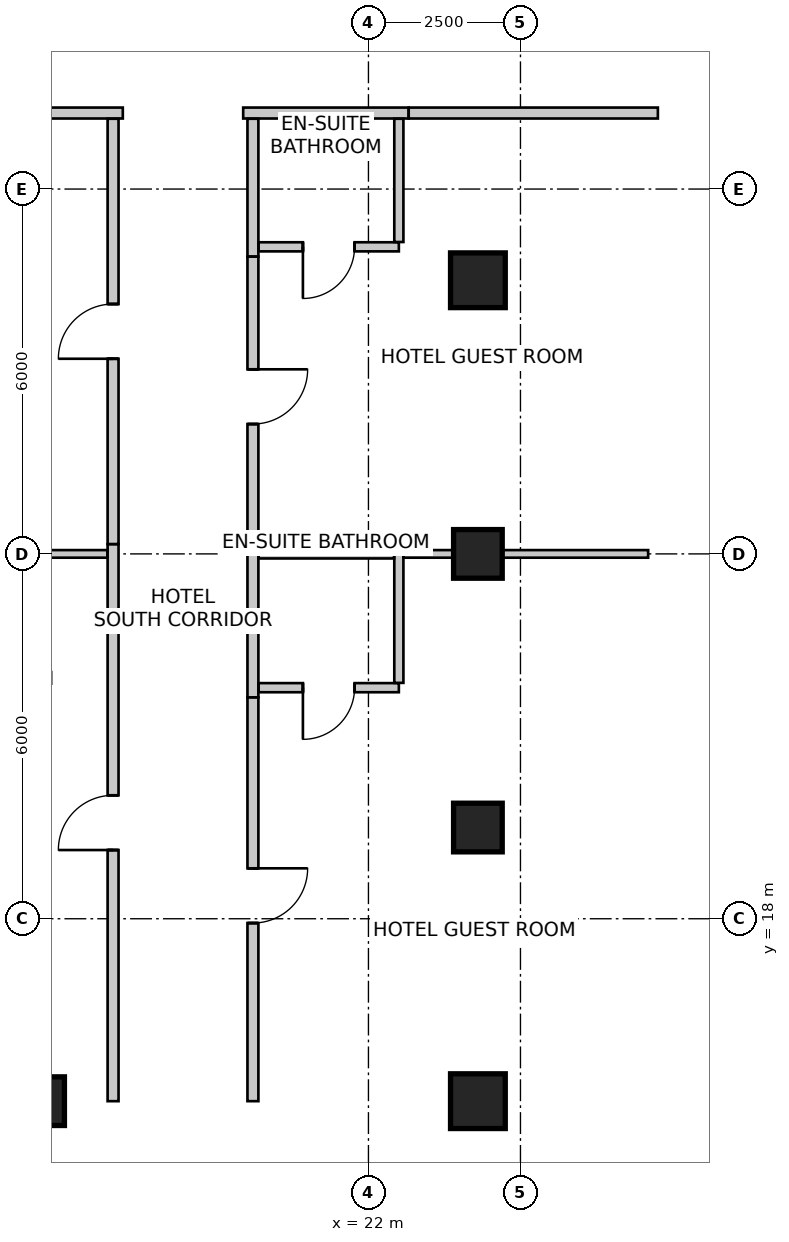
"""IFC4 building model, lengths in metres.
Left out: names, types, materials, properties, quantities, classifications, styles, units other than length and angle.
Written with IfcOpenShell. Run it as: python <this file> out.ifc"""

import sys

from ifc_helpers import new_model, si_unit, direction, frame, frame_2d, origin, origin_2d, place, context, subcontext, project, spatial, rectangle, extrude, source, transform, mapped, element, fill, save


model = new_model("IFC4")
c1 = context("Model", 3, precision=1e-05, world=origin(), true_north=direction((0.0, 1.0)))
c2 = subcontext(c1, "Body", "Model", "MODEL_VIEW")
j1 = project(units=[si_unit("LENGTHUNIT", "METRE"), si_unit("PLANEANGLEUNIT", "RADIAN")], contexts=[c1])
p1 = place(None, origin())
s1 = spatial("IfcSite", under=j1, at=p1, CompositionType="ELEMENT")
p2 = place(p1, origin())
s2 = spatial("IfcBuilding", under=s1, at=p2, CompositionType="ELEMENT")
p3 = place(p2, frame((0.0, 0.0, 114.2)))
s3 = spatial("IfcBuildingStorey", under=s2, at=p3, CompositionType="ELEMENT", Elevation=114.2)
m1 = source(origin(), c2, "Body", "SweptSolid", [
    extrude(rectangle(XDim=0.9, YDim=0.9, at=origin_2d()), origin(), (0.0, 0.0, 1.0), 3.6),
])
p4 = place(p3, frame((23.8, 28.5, 0.0), z_axis=(0.0, 0.0, 1.0), x_axis=(1.0, 0.0, 0.0)))
e1 = element("IfcColumn", 1, at=p4, inside=s3, PredefinedType="COLUMN", context=c2, shape_type="MappedRepresentation", body=[
    mapped(m1, transform((0.0, 0.0, 0.0), scale=1.0)),
])
m2 = source(origin(), c2, "Body", "SweptSolid", [
    extrude(rectangle(XDim=0.8, YDim=0.8, at=origin_2d()), origin(), (0.0, 0.0, 1.0), 3.6),
])
for number, where, z_axis, x_axis in (
    (2, (23.8, 24.0, 0.0), (0.0, 0.0, 1.0), (1.0, 0.0, 0.0)),
    (3, (23.8, 19.5, 0.0), (0.0, 0.0, 1.0), (1.0, 0.0, 0.0)),
):
    element("IfcColumn", number, at=place(p3, frame(where, z_axis=z_axis, x_axis=x_axis)), inside=s3, PredefinedType="COLUMN", context=c2, shape_type="MappedRepresentation", body=[
        mapped(m2, transform((0.0, 0.0, 0.0), scale=1.0)),
    ])
p5 = place(p3, frame((23.8, 15.0, 0.0), z_axis=(0.0, 0.0, 1.0), x_axis=(1.0, 0.0, 0.0)))
e4 = element("IfcColumn", 4, at=p5, inside=s3, PredefinedType="COLUMN", context=c2, shape_type="MappedRepresentation", body=[
    mapped(m1, transform((0.0, 0.0, 0.0), scale=1.0)),
])
p6 = place(p3, frame((16.6, 15.0, 0.0), z_axis=(0.0, 0.0, 1.0), x_axis=(1.0, 0.0, 0.0)))
e5 = element("IfcColumn", 5, at=p6, inside=s3, PredefinedType="COLUMN", context=c2, shape_type="MappedRepresentation", body=[
    mapped(m2, transform((0.0, 0.0, 0.0), scale=1.0)),
])
p7 = place(p3, frame((17.96, 31.25, 0.0), z_axis=(0.0, 0.0, 1.0), x_axis=(-1.0, 0.0, 0.0)))
e6 = element("IfcWall", 6, at=p7, inside=s3, PredefinedType="PARTITIONING", context=c2, shape_type="SweptSolid", body=[
    extrude(rectangle(XDim=5.366, YDim=0.18, at=frame_2d((2.683, 0.0))), origin(), (0.0, 0.0, 1.0), 2.935),
])
p8 = place(p3, frame((22.66, 31.25, 0.0), z_axis=(0.0, 0.0, 1.0), x_axis=(-1.0, 0.0, 0.0)))
e7 = element("IfcWall", 7, at=p8, inside=s3, PredefinedType="PARTITIONING", context=c2, shape_type="SweptSolid", body=[
    extrude(rectangle(XDim=2.72, YDim=0.18, at=frame_2d((1.36, 0.0))), origin(), (0.0, 0.0, 1.0), 2.935),
])
p9 = place(p3, frame((26.76, 31.25, 0.0), z_axis=(0.0, 0.0, 1.0), x_axis=(-1.0, 0.0, 0.0)))
e8 = element("IfcWall", 8, at=p9, inside=s3, PredefinedType="PARTITIONING", context=c2, shape_type="SweptSolid", body=[
    extrude(rectangle(XDim=4.098, YDim=0.18, at=frame_2d((2.049, 0.0))), origin(), (0.0, 0.0, 1.0), 3.35),
])
p10 = place(p3, frame((17.8, 15.0, 0.0), z_axis=(0.0, 0.0, 1.0), x_axis=(0.0, 1.0, 0.0)))
e9 = element("IfcWall", 9, at=p10, inside=s3, PredefinedType="PARTITIONING", context=c2, shape_type="SweptSolid", body=[
    extrude(rectangle(XDim=9.16, YDim=0.18, at=frame_2d((4.58, 0.0))), origin(), (0.0, 0.0, 1.0), 2.492),
])
m3 = source(origin(), c2, "Body", "SweptSolid", [
    extrude(rectangle(XDim=0.9, YDim=2.15, at=frame_2d((0.45, 1.075))), frame((0.0, 0.1, 0.0), z_axis=(0.0, -1.0, 0.0), x_axis=(1.0, 0.0, 0.0)), (0.0, 0.0, 1.0), 0.2),
])
p11 = place(p10, frame((4.13, 0.0, 0.0)))
e10 = element("IfcOpeningElement", 10, at=p11, cuts=e9, PredefinedType="OPENING", context=c2, shape_type="MappedRepresentation", body=[
    mapped(m3, transform((0.0, 0.0, 0.0), scale=1.0)),
])
p12 = place(p3, frame((20.1, 24.16, 0.0), z_axis=(0.0, 0.0, 1.0), x_axis=(0.0, -1.0, 0.0)))
e11 = element("IfcWall", 11, at=p12, inside=s3, PredefinedType="PARTITIONING", context=c2, shape_type="SweptSolid", body=[
    extrude(rectangle(XDim=2.52, YDim=0.18, at=frame_2d((1.26, 0.0))), origin(), (0.0, 0.0, 1.0), 2.803),
])
p13 = place(p3, frame((20.1, 21.638, 0.0), z_axis=(0.0, 0.0, 1.0), x_axis=(0.0, -1.0, 0.0)))
e12 = element("IfcWall", 12, at=p13, inside=s3, PredefinedType="PARTITIONING", context=c2, shape_type="SweptSolid", body=[
    extrude(rectangle(XDim=6.638, YDim=0.18, at=frame_2d((3.319, 0.0))), origin(), (0.0, 0.0, 1.0), 2.492),
])
p14 = place(p13, frame((2.809, 0.0, 0.0)))
e13 = element("IfcOpeningElement", 13, at=p14, cuts=e12, PredefinedType="OPENING", context=c2, shape_type="MappedRepresentation", body=[
    mapped(m3, transform((0.0, 0.0, 0.0), scale=1.0)),
])
p15 = place(p3, frame((17.8, 24.162, 0.0), z_axis=(0.0, 0.0, 1.0), x_axis=(0.0, 1.0, 0.0)))
e14 = element("IfcWall", 14, at=p15, inside=s3, PredefinedType="PARTITIONING", context=c2, shape_type="SweptSolid", body=[
    extrude(rectangle(XDim=6.994, YDim=0.18, at=frame_2d((3.497, 0.0))), origin(), (0.0, 0.0, 1.0), 2.788),
])
p16 = place(p15, frame((3.047, 0.0, 0.0)))
e15 = element("IfcOpeningElement", 15, at=p16, cuts=e14, PredefinedType="OPENING", context=c2, shape_type="MappedRepresentation", body=[
    mapped(m3, transform((0.0, 0.0, 0.0), scale=1.0)),
])
p17 = place(p3, frame((20.1, 31.156, 0.0), z_axis=(0.0, 0.0, 1.0), x_axis=(0.0, -1.0, 0.0)))
e16 = element("IfcWall", 16, at=p17, inside=s3, PredefinedType="PARTITIONING", context=c2, shape_type="SweptSolid", body=[
    extrude(rectangle(XDim=2.266, YDim=0.18, at=frame_2d((1.133, 0.0))), origin(), (0.0, 0.0, 1.0), 2.935),
])
p18 = place(p3, frame((20.1, 28.888, 0.0), z_axis=(0.0, 0.0, 1.0), x_axis=(0.0, -1.0, 0.0)))
e17 = element("IfcWall", 17, at=p18, inside=s3, PredefinedType="PARTITIONING", context=c2, shape_type="SweptSolid", body=[
    extrude(rectangle(XDim=4.726, YDim=0.18, at=frame_2d((2.363, 0.0))), origin(), (0.0, 0.0, 1.0), 2.788),
])
p19 = place(p18, frame((1.853, 0.0, 0.0)))
e18 = element("IfcOpeningElement", 18, at=p19, cuts=e17, PredefinedType="OPENING", context=c2, shape_type="MappedRepresentation", body=[
    mapped(m3, transform((0.0, 0.0, 0.0), scale=1.0)),
])
p20 = place(p3, frame((12.295, 24.0, 0.0), z_axis=(0.0, 0.0, 1.0), x_axis=(1.0, 0.0, 0.0)))
e19 = element("IfcWall", 19, at=p20, inside=s3, PredefinedType="PARTITIONING", context=c2, shape_type="SweptSolid", body=[
    extrude(rectangle(XDim=5.411, YDim=0.125, at=frame_2d((2.706, 0.0))), origin(), (0.0, 0.0, 1.0), 2.803),
])
p21 = place(p3, frame((22.5, 21.8, 0.0), z_axis=(0.0, 0.0, 1.0), x_axis=(-1.0, 0.0, 0.0)))
e20 = element("IfcWall", 20, at=p21, inside=s3, PredefinedType="PARTITIONING", context=c2, shape_type="SweptSolid", body=[
    extrude(rectangle(XDim=2.306, YDim=0.15, at=frame_2d((1.153, 0.0))), origin(), (0.0, 0.0, 1.0), 3.35),
])
m4 = source(origin(), c2, "Body", "SweptSolid", [
    extrude(rectangle(XDim=0.85, YDim=2.15, at=frame_2d((0.425, 1.075))), frame((0.0, 0.085, 0.0), z_axis=(0.0, -1.0, 0.0), x_axis=(1.0, 0.0, 0.0)), (0.0, 0.0, 1.0), 0.17),
])
p22 = place(p21, frame((0.728, 0.0, 0.0)))
e21 = element("IfcOpeningElement", 21, at=p22, cuts=e20, PredefinedType="OPENING", context=c2, shape_type="MappedRepresentation", body=[
    mapped(m4, transform((0.0, 0.0, 0.0), scale=1.0)),
])
p23 = place(p3, frame((22.5, 24.0, 0.0), z_axis=(0.0, 0.0, 1.0), x_axis=(0.0, -1.0, 0.0)))
e22 = element("IfcWall", 22, at=p23, inside=s3, PredefinedType="PARTITIONING", context=c2, shape_type="SweptSolid", body=[
    extrude(rectangle(XDim=2.121, YDim=0.15, at=frame_2d((1.061, 0.0))), origin(), (0.0, 0.0, 1.0), 2.803),
])
p24 = place(p3, frame((20.194, 24.0, 0.0), z_axis=(0.0, 0.0, 1.0), x_axis=(1.0, 0.0, 0.0)))
e23 = element("IfcWall", 23, at=p24, inside=s3, PredefinedType="PARTITIONING", context=c2, shape_type="SweptSolid", body=[
    extrude(rectangle(XDim=2.227, YDim=0.15, at=frame_2d((1.113, 0.0))), origin(), (0.0, 0.0, 1.0), 2.803),
])
p25 = place(p3, frame((22.579, 24.0, 0.0), z_axis=(0.0, 0.0, 1.0), x_axis=(1.0, 0.0, 0.0)))
e24 = element("IfcWall", 24, at=p25, inside=s3, PredefinedType="PARTITIONING", context=c2, shape_type="SweptSolid", body=[
    extrude(rectangle(XDim=4.021, YDim=0.125, at=frame_2d((2.01, 0.0))), origin(), (0.0, 0.0, 1.0), 2.492),
])
p26 = place(p3, frame((22.5, 29.05, 0.0), z_axis=(0.0, 0.0, 1.0), x_axis=(-1.0, 0.0, 0.0)))
e25 = element("IfcWall", 25, at=p26, inside=s3, PredefinedType="PARTITIONING", context=c2, shape_type="SweptSolid", body=[
    extrude(rectangle(XDim=2.306, YDim=0.15, at=frame_2d((1.153, 0.0))), origin(), (0.0, 0.0, 1.0), 2.935),
])
p27 = place(p26, frame((0.728, 0.0, 0.0)))
e26 = element("IfcOpeningElement", 26, at=p27, cuts=e25, PredefinedType="OPENING", context=c2, shape_type="MappedRepresentation", body=[
    mapped(m4, transform((0.0, 0.0, 0.0), scale=1.0)),
])
p28 = place(p3, frame((22.5, 31.156, 0.0), z_axis=(0.0, 0.0, 1.0), x_axis=(0.0, -1.0, 0.0)))
e27 = element("IfcWall", 27, at=p28, inside=s3, PredefinedType="PARTITIONING", context=c2, shape_type="SweptSolid", body=[
    extrude(rectangle(XDim=2.027, YDim=0.15, at=frame_2d((1.014, 0.0))), origin(), (0.0, 0.0, 1.0), 2.935),
])
m5 = source(origin(), c2, "Body", "SweptSolid", [
    extrude(rectangle(XDim=0.9, YDim=2.15, at=frame_2d((0.45, 1.075))), frame((0.0, 0.025, 0.0), z_axis=(0.0, -1.0, 0.0), x_axis=(1.0, 0.0, 0.0)), (0.0, 0.0, 1.0), 0.05),
])
p29 = place(p11, origin())
e28 = element("IfcDoor", 28, at=p29, inside=s3, OperationType="SINGLE_SWING_LEFT", PredefinedType="DOOR", context=c2, shape_type="MappedRepresentation", body=[
    mapped(m5, transform((0.0, 0.0, 0.0), scale=1.0)),
])
fill(e10, e28)
m6 = source(origin(), c2, "Body", "SweptSolid", [
    extrude(rectangle(XDim=0.85, YDim=2.15, at=frame_2d((0.425, 1.075))), frame((0.0, 0.025, 0.0), z_axis=(0.0, -1.0, 0.0), x_axis=(1.0, 0.0, 0.0)), (0.0, 0.0, 1.0), 0.05),
])
p30 = place(p22, origin())
e29 = element("IfcDoor", 29, at=p30, inside=s3, OperationType="SINGLE_SWING_RIGHT", PredefinedType="DOOR", context=c2, shape_type="MappedRepresentation", body=[
    mapped(m6, transform((0.0, 0.0, 0.0), scale=1.0)),
])
fill(e21, e29)
p31 = place(p14, origin())
e30 = element("IfcDoor", 30, at=p31, inside=s3, OperationType="SINGLE_SWING_LEFT", PredefinedType="DOOR", context=c2, shape_type="MappedRepresentation", body=[
    mapped(m5, transform((0.0, 0.0, 0.0), scale=1.0)),
])
fill(e13, e30)
p32 = place(p16, origin())
e31 = element("IfcDoor", 31, at=p32, inside=s3, OperationType="SINGLE_SWING_LEFT", PredefinedType="DOOR", context=c2, shape_type="MappedRepresentation", body=[
    mapped(m5, transform((0.0, 0.0, 0.0), scale=1.0)),
])
fill(e15, e31)
p33 = place(p27, origin())
e32 = element("IfcDoor", 32, at=p33, inside=s3, OperationType="SINGLE_SWING_RIGHT", PredefinedType="DOOR", context=c2, shape_type="MappedRepresentation", body=[
    mapped(m6, transform((0.0, 0.0, 0.0), scale=1.0)),
])
fill(e26, e32)
p34 = place(p19, origin())
e33 = element("IfcDoor", 33, at=p34, inside=s3, OperationType="SINGLE_SWING_LEFT", PredefinedType="DOOR", context=c2, shape_type="MappedRepresentation", body=[
    mapped(m5, transform((0.0, 0.0, 0.0), scale=1.0)),
])
fill(e18, e33)
save(model, sys.argv[1])
